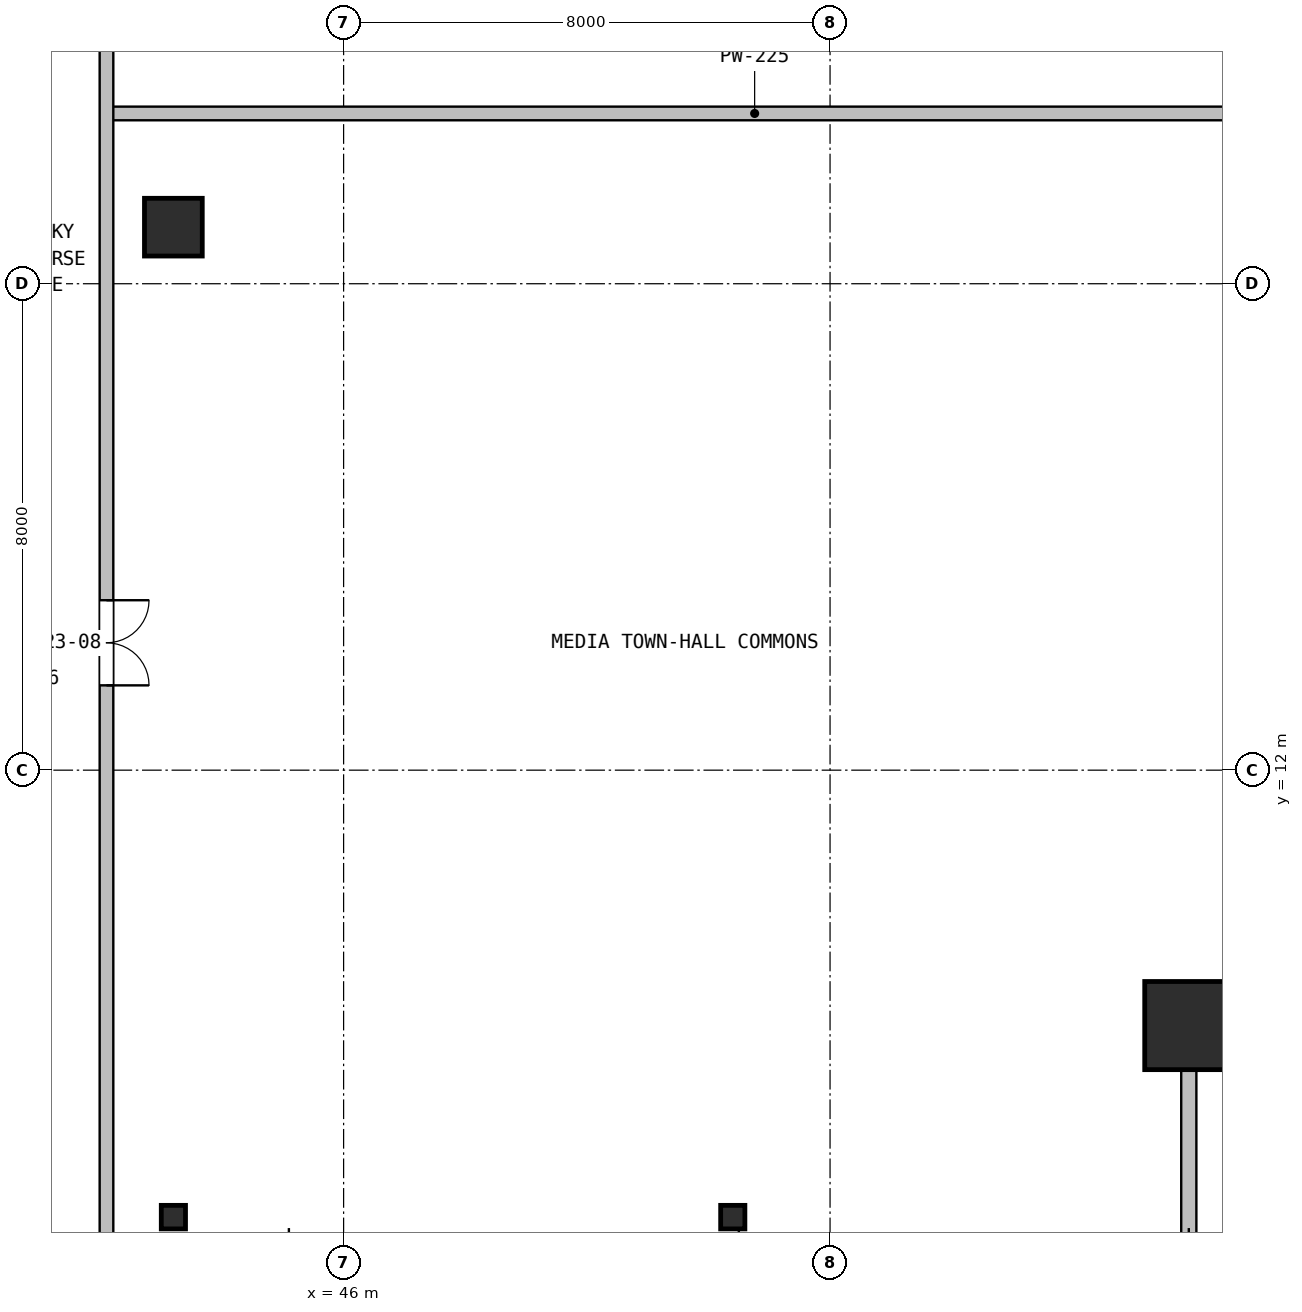
"""IFC4 building model, lengths in metres.
Left out: names, types, materials, properties, quantities, classifications, styles, units other than length and angle.
Written with IfcOpenShell. Run it as: python <this file> out.ifc"""

import sys

from ifc_helpers import new_model, si_unit, direction, frame, frame_2d, origin, origin_2d, place, context, subcontext, project, spatial, rectangle, hollow_rectangle, i_section, extrude, source, transform, mapped, element, fill, save


model = new_model("IFC4")
c1 = context("Model", 3, precision=1e-05, world=origin(), true_north=direction((0.0, 1.0)))
c2 = subcontext(c1, "Body", "Model", "MODEL_VIEW")
j1 = project(units=[si_unit("LENGTHUNIT", "METRE"), si_unit("PLANEANGLEUNIT", "RADIAN")], contexts=[c1])
p1 = place(None, origin())
s1 = spatial("IfcSite", under=j1, at=p1, CompositionType="ELEMENT")
p2 = place(p1, origin())
s2 = spatial("IfcBuilding", under=s1, at=p2, CompositionType="ELEMENT")
p3 = place(p2, frame((0.0, 0.0, 98.4)))
s3 = spatial("IfcBuildingStorey", under=s2, at=p3, CompositionType="ELEMENT", Elevation=98.4)
m1 = source(origin(), c2, "Body", "SweptSolid", [
    extrude(hollow_rectangle(XDim=1.45, YDim=1.45, WallThickness=0.055, at=origin_2d()), origin(), (0.0, 0.0, 1.0), 4.6),
])
p4 = place(p3, frame((59.9, 7.8, 0.0), z_axis=(0.0, 0.0, 1.0), x_axis=(1.0, 0.0, 0.0)))
e1 = element("IfcColumn", 1, at=p4, inside=s3, PredefinedType="COLUMN", context=c2, shape_type="MappedRepresentation", body=[
    mapped(m1, transform((0.0, 0.0, 0.0), x_axis=(1.0, 0.0, 0.0), y_axis=(0.0, 1.0, 0.0), z_axis=(0.0, 0.0, 1.0), scale=1.0)),
])
m2 = source(origin(), c2, "Body", "SweptSolid", [
    extrude(i_section(OverallWidth=0.398, OverallDepth=0.387, WebThickness=0.021, FlangeThickness=0.033, FilletRadius=0.018, at=origin_2d()), origin(), (0.0, 0.0, 1.0), 4.6),
])
for number, where, z_axis, x_axis in (
    (2, (43.2, 4.65, 0.0), (0.0, 0.0, 1.0), (1.0, 0.0, 0.0)),
    (3, (52.4, 4.65, 0.0), (0.0, 0.0, 1.0), (1.0, 0.0, 0.0)),
):
    element("IfcColumn", number, at=place(p3, frame(where, z_axis=z_axis, x_axis=x_axis)), inside=s3, PredefinedType="COLUMN", context=c2, shape_type="MappedRepresentation", body=[
        mapped(m2, transform((0.0, 0.0, 0.0), x_axis=(1.0, 0.0, 0.0), y_axis=(0.0, 1.0, 0.0), z_axis=(0.0, 0.0, 1.0), scale=1.0)),
    ])
m3 = source(origin(), c2, "Body", "SweptSolid", [
    extrude(rectangle(XDim=0.95, YDim=0.95, at=origin_2d()), origin(), (0.0, 0.0, 1.0), 4.6),
])
p5 = place(p3, frame((43.2, 20.93, 0.0), z_axis=(0.0, 0.0, 1.0), x_axis=(1.0, 0.0, 0.0)))
e4 = element("IfcColumn", 4, at=p5, inside=s3, PredefinedType="COLUMN", context=c2, shape_type="MappedRepresentation", body=[
    mapped(m3, transform((0.0, 0.0, 0.0), x_axis=(1.0, 0.0, 0.0), y_axis=(0.0, 1.0, 0.0), z_axis=(0.0, 0.0, 1.0), scale=1.0)),
])
p6 = place(p3, frame((59.9, 4.28, 0.0), z_axis=(0.0, 0.0, 1.0), x_axis=(0.0, 1.0, 0.0)))
e5 = element("IfcWall", 5, at=p6, inside=s3, PredefinedType="SOLIDWALL", context=c2, shape_type="SweptSolid", body=[
    extrude(rectangle(XDim=3.6, YDim=0.25, at=frame_2d((1.8, 0.0))), origin(), (0.0, 0.0, 1.0), 3.908),
])
p7 = place(p3, frame((42.2, 22.8, 0.0), z_axis=(0.0, 0.0, 1.0), x_axis=(1.0, 0.0, 0.0)))
e6 = element("IfcWall", 6, at=p7, inside=s3, PredefinedType="PARTITIONING", context=c2, shape_type="SweptSolid", body=[
    extrude(rectangle(XDim=21.12, YDim=0.225, at=frame_2d((10.56, 0.0))), origin(), (0.0, 0.0, 1.0), 3.63),
])
p8 = place(p3, frame((42.1, 4.38, 0.0), z_axis=(0.0, 0.0, 1.0), x_axis=(0.0, 1.0, 0.0)))
e7 = element("IfcWall", 7, at=p8, inside=s3, PredefinedType="PARTITIONING", context=c2, shape_type="SweptSolid", body=[
    extrude(rectangle(XDim=28.645, YDim=0.225, at=frame_2d((14.323, 0.0))), origin(), (0.0, 0.0, 1.0), 3.63),
])
p9 = place(p8, frame((9.015, 0.0, 0.0)))
e8 = element("IfcOpeningElement", 8, at=p9, cuts=e7, PredefinedType="OPENING", context=c2, shape_type="SweptSolid", body=[
    extrude(rectangle(XDim=1.4, YDim=2.12, at=frame_2d((0.7, 1.06))), frame((0.0, 0.123, 0.0), z_axis=(0.0, -1.0, 0.0), x_axis=(1.0, 0.0, 0.0)), (0.0, 0.0, 1.0), 0.245),
])
m4 = source(origin(), c2, "Body", "SweptSolid", [
    extrude(rectangle(XDim=1.4, YDim=2.12, at=frame_2d((0.7, 1.06))), frame((0.0, 0.025, 0.0), z_axis=(0.0, -1.0, 0.0), x_axis=(1.0, 0.0, 0.0)), (0.0, 0.0, 1.0), 0.05),
])
p10 = place(p9, frame((1.4, 0.0, 0.0), z_axis=(0.0, 0.0, 1.0), x_axis=(-1.0, 0.0, 0.0)))
e9 = element("IfcDoor", 9, at=p10, inside=s3, OperationType="DOUBLE_DOOR_SINGLE_SWING", PredefinedType="DOOR", context=c2, shape_type="MappedRepresentation", body=[
    mapped(m4, transform((0.0, 0.0, 0.0), x_axis=(1.0, 0.0, 0.0), y_axis=(0.0, 1.0, 0.0), z_axis=(0.0, 0.0, 1.0), scale=1.0)),
])
fill(e8, e9)
save(model, sys.argv[1])
